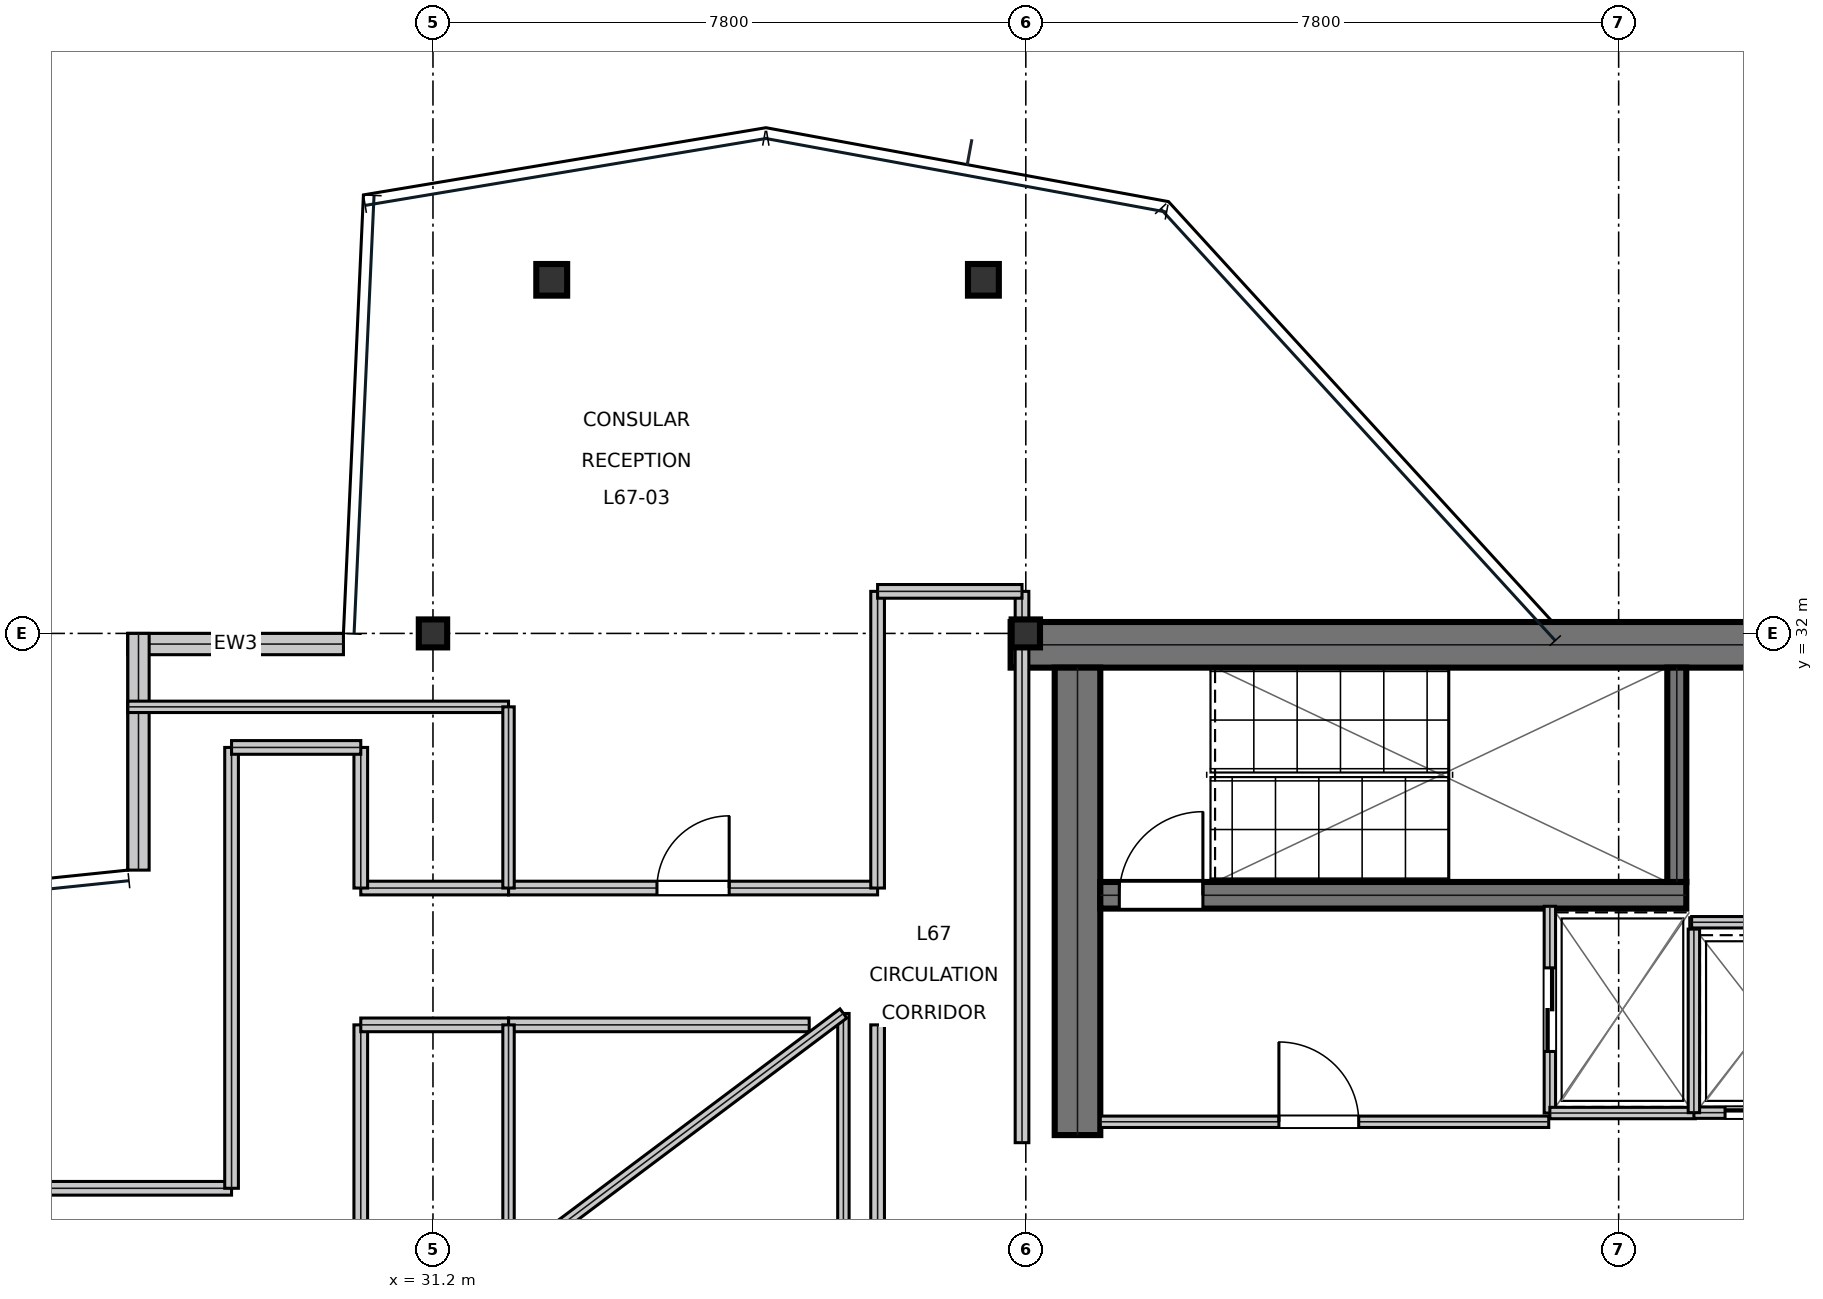
"""IFC4 building model, lengths in metres.
Left out: names, types, materials, properties, quantities, classifications, styles, units other than length and angle.
Written with IfcOpenShell. Run it as: python <this file> out.ifc"""

import sys

from ifc_helpers import new_model, si_unit, direction, frame, frame_2d, origin, origin_2d, place, context, subcontext, project, spatial, rectangle, i_section, extrude, element, fill, save


model = new_model("IFC4")
c1 = context("Model", 3, precision=1e-05, world=origin(), true_north=direction((0.0, 1.0)))
c2 = subcontext(c1, "Body", "Model", "MODEL_VIEW")
j1 = project(units=[si_unit("LENGTHUNIT", "METRE"), si_unit("PLANEANGLEUNIT", "RADIAN")], contexts=[c1])
p1 = place(None, origin())
s1 = spatial("IfcSite", under=j1, at=p1, CompositionType="ELEMENT")
p2 = place(p1, origin())
s2 = spatial("IfcBuilding", under=s1, at=p2, CompositionType="ELEMENT")
p3 = place(p2, frame((0.0, 0.0, 287.1)))
s3 = spatial("IfcBuildingStorey", under=s2, at=p3, CompositionType="ELEMENT", Elevation=287.1)
p4 = place(p3, frame((38.8, 31.85, 0.0), z_axis=(0.0, 0.0, 1.0), x_axis=(1.0, 0.0, 0.0)))
e1 = element("IfcWall", 1, at=p4, inside=s3, PredefinedType="SHEAR", context=c2, shape_type="SweptSolid", body=[
    extrude(rectangle(XDim=16.0, YDim=0.6, at=frame_2d((8.0, 0.0))), origin(), (0.0, 0.0, 1.0), 3.81),
])
p5 = place(p3, frame((39.68, 25.4, 0.0), z_axis=(0.0, 0.0, 1.0), x_axis=(0.0, 1.0, 0.0)))
e2 = element("IfcWall", 2, at=p5, inside=s3, PredefinedType="SHEAR", context=c2, shape_type="SweptSolid", body=[
    extrude(rectangle(XDim=6.15, YDim=0.6, at=frame_2d((3.075, 0.0))), origin(), (0.0, 0.0, 1.0), 3.81),
])
p6 = place(p3, frame((39.98, 28.555, 0.0), z_axis=(0.0, 0.0, 1.0), x_axis=(1.0, 0.0, 0.0)))
e3 = element("IfcWall", 3, at=p6, inside=s3, PredefinedType="SHEAR", context=c2, shape_type="SweptSolid", body=[
    extrude(rectangle(XDim=7.71, YDim=0.35, at=frame_2d((3.855, 0.0))), origin(), (0.0, 0.0, 1.0), 3.81),
])
p7 = place(p6, frame((0.25, 0.0, 0.0)))
e4 = element("IfcOpeningElement", 4, at=p7, cuts=e3, PredefinedType="OPENING", context=c2, shape_type="SweptSolid", body=[
    extrude(rectangle(XDim=1.1, YDim=2.15, at=frame_2d((0.55, 1.075))), frame((0.0, 0.185, 0.0), z_axis=(0.0, -1.0, 0.0), x_axis=(1.0, 0.0, 0.0)), (0.0, 0.0, 1.0), 0.37),
])
p8 = place(p3, frame((47.565, 28.73, 0.0), z_axis=(0.0, 0.0, 1.0), x_axis=(0.0, 1.0, 0.0)))
e5 = element("IfcWall", 5, at=p8, inside=s3, PredefinedType="SHEAR", context=c2, shape_type="SweptSolid", body=[
    extrude(rectangle(XDim=2.82, YDim=0.25, at=frame_2d((1.41, 0.0))), origin(), (0.0, 0.0, 1.0), 3.81),
])
for number, where, z_axis, x_axis in (
    (6, (31.2, 32.0, 0.0), (0.0, 0.0, 1.0), (1.0, 0.0, 0.0)),
    (7, (39.0, 32.0, 0.0), (0.0, 0.0, 1.0), (1.0, 0.0, 0.0)),
):
    element("IfcColumn", number, at=place(p3, frame(where, z_axis=z_axis, x_axis=x_axis)), inside=s3, PredefinedType="COLUMN", context=c2, shape_type="SweptSolid", body=[
        extrude(i_section(OverallWidth=0.373, OverallDepth=0.368, WebThickness=0.015, FlangeThickness=0.024, at=origin_2d()), origin(), (0.0, 0.0, 1.0), 4.044),
    ])
p9 = place(p3, frame((32.762, 36.652, 0.016), z_axis=(0.013906647751, -0.029878037962, 0.999456806468), x_axis=(0.906606370736, 0.421977355485, 0.0)))
e8 = element("IfcColumn", 8, at=p9, inside=s3, PredefinedType="COLUMN", context=c2, shape_type="SweptSolid", body=[
    extrude(i_section(OverallWidth=0.406, OverallDepth=0.416, WebThickness=0.03, FlangeThickness=0.048, at=origin_2d()), origin(), (0.0, 0.0, 1.0), 4.02),
])
p10 = place(p3, frame((38.442, 36.652, 0.016), z_axis=(-0.004919361467, -0.029880565948, 0.99954137066), x_axis=(0.986717213658, -0.162447346151, 0.0)))
e9 = element("IfcColumn", 9, at=p10, inside=s3, PredefinedType="COLUMN", context=c2, shape_type="SweptSolid", body=[
    extrude(i_section(OverallWidth=0.406, OverallDepth=0.416, WebThickness=0.03, FlangeThickness=0.048, at=origin_2d()), origin(), (0.0, 0.0, 1.0), 4.02),
])
p11 = place(p3, frame((30.022, 31.86, 0.0), z_axis=(0.0, 0.0, 1.0), x_axis=(-1.0, 0.0, 0.0)))
e10 = element("IfcWall", 10, at=p11, inside=s3, PredefinedType="STANDARD", context=c2, shape_type="SweptSolid", body=[
    extrude(rectangle(XDim=2.836, YDim=0.28, at=frame_2d((1.418, 0.0))), origin(), (0.0, 0.0, 1.0), 3.81),
])
p12 = place(p3, frame((27.326, 32.0, 0.0), z_axis=(0.0, 0.0, 1.0), x_axis=(0.0, -1.0, 0.0)))
e11 = element("IfcWall", 11, at=p12, inside=s3, PredefinedType="STANDARD", context=c2, shape_type="SweptSolid", body=[
    extrude(rectangle(XDim=3.114, YDim=0.28, at=frame_2d((1.557, 0.0))), origin(), (0.0, 0.0, 1.0), 3.339),
])
p13 = place(p3, frame((39.98, 25.575, 0.0), z_axis=(0.0, 0.0, 1.0), x_axis=(1.0, 0.0, 0.0)))
e12 = element("IfcWall", 12, at=p13, inside=s3, PredefinedType="PARTITIONING", context=c2, shape_type="SweptSolid", body=[
    extrude(rectangle(XDim=5.9, YDim=0.15, at=frame_2d((2.95, 0.0))), origin(), (0.0, 0.0, 1.0), 3.81),
])
p14 = place(p13, frame((2.35, 0.0, 0.0)))
e13 = element("IfcOpeningElement", 13, at=p14, cuts=e12, PredefinedType="OPENING", context=c2, shape_type="SweptSolid", body=[
    extrude(rectangle(XDim=1.05, YDim=2.15, at=frame_2d((0.525, 1.075))), frame((0.0, 0.085, 0.0), z_axis=(0.0, -1.0, 0.0), x_axis=(1.0, 0.0, 0.0)), (0.0, 0.0, 1.0), 0.17),
])
p15 = place(p3, frame((45.895, 25.69, 0.0), z_axis=(0.0, 0.0, 1.0), x_axis=(0.0, 1.0, 0.0)))
e14 = element("IfcWall", 14, at=p15, inside=s3, PredefinedType="PARTITIONING", context=c2, shape_type="SweptSolid", body=[
    extrude(rectangle(XDim=2.72, YDim=0.15, at=frame_2d((1.36, 0.0))), origin(), (0.0, 0.0, 1.0), 3.81),
])
p16 = place(p15, frame((0.81, 0.0, 0.0)))
e15 = element("IfcOpeningElement", 15, at=p16, cuts=e14, PredefinedType="OPENING", context=c2, shape_type="SweptSolid", body=[
    extrude(rectangle(XDim=1.1, YDim=2.15, at=frame_2d((0.55, 1.075))), frame((0.0, 0.085, 0.0), z_axis=(0.0, -1.0, 0.0), x_axis=(1.0, 0.0, 0.0)), (0.0, 0.0, 1.0), 0.17),
])
p17 = place(p3, frame((45.895, 25.69, 0.0), z_axis=(0.0, 0.0, 1.0), x_axis=(1.0, 0.0, 0.0)))
e16 = element("IfcWall", 16, at=p17, inside=s3, PredefinedType="PARTITIONING", context=c2, shape_type="SweptSolid", body=[
    extrude(rectangle(XDim=1.915, YDim=0.15, at=frame_2d((0.958, 0.0))), origin(), (0.0, 0.0, 1.0), 3.81),
])
p18 = place(p3, frame((47.79, 25.695, 0.0), z_axis=(0.0, 0.0, 1.0), x_axis=(1.0, 0.0, 0.0)))
e17 = element("IfcWall", 17, at=p18, inside=s3, PredefinedType="PARTITIONING", context=c2, shape_type="SweptSolid", body=[
    extrude(rectangle(XDim=1.92, YDim=0.15, at=frame_2d((0.96, 0.0))), origin(), (0.0, 0.0, 1.0), 3.81),
])
p19 = place(p18, frame((0.41, 0.0, 0.0)))
e18 = element("IfcOpeningElement", 18, at=p19, cuts=e17, PredefinedType="OPENING", context=c2, shape_type="SweptSolid", body=[
    extrude(rectangle(XDim=1.1, YDim=2.15, at=frame_2d((0.55, 1.075))), frame((0.0, 0.085, 0.0), z_axis=(0.0, -1.0, 0.0), x_axis=(1.0, 0.0, 0.0)), (0.0, 0.0, 1.0), 0.17),
])
p20 = place(p3, frame((47.79, 25.695, 0.0), z_axis=(0.0, 0.0, 1.0), x_axis=(0.0, 1.0, 0.0)))
e19 = element("IfcWall", 19, at=p20, inside=s3, PredefinedType="PARTITIONING", context=c2, shape_type="SweptSolid", body=[
    extrude(rectangle(XDim=2.415, YDim=0.15, at=frame_2d((1.208, 0.0))), origin(), (0.0, 0.0, 1.0), 3.81),
])
p21 = place(p3, frame((47.76, 28.2, 0.0), z_axis=(0.0, 0.0, 1.0), x_axis=(1.0, 0.0, 0.0)))
e20 = element("IfcWall", 20, at=p21, inside=s3, PredefinedType="PARTITIONING", context=c2, shape_type="SweptSolid", body=[
    extrude(rectangle(XDim=2.04, YDim=0.15, at=frame_2d((1.02, 0.0))), origin(), (0.0, 0.0, 1.0), 3.81),
])
p22 = place(p3, frame((37.05, 15.447, 0.0), z_axis=(0.0, 0.0, 1.0), x_axis=(0.0, 1.0, 0.0)))
e21 = element("IfcWall", 21, at=p22, inside=s3, PredefinedType="SOLIDWALL", context=c2, shape_type="SweptSolid", body=[
    extrude(rectangle(XDim=11.403, YDim=0.18, at=frame_2d((5.702, 0.0))), origin(), (0.0, 0.0, 1.0), 3.27),
])
p23 = place(p22, frame((3.607, 0.0, 0.0)))
e22 = element("IfcOpeningElement", 22, at=p23, cuts=e21, PredefinedType="OPENING", context=c2, shape_type="SweptSolid", body=[
    extrude(rectangle(XDim=0.95, YDim=2.15, at=frame_2d((0.475, 1.075))), frame((0.0, 0.1, 0.0), z_axis=(0.0, -1.0, 0.0), x_axis=(1.0, 0.0, 0.0)), (0.0, 0.0, 1.0), 0.2),
])
p24 = place(p3, frame((30.25, 17.5, 0.0), z_axis=(0.0, 0.0, 1.0), x_axis=(0.0, 1.0, 0.0)))
e23 = element("IfcWall", 23, at=p24, inside=s3, PredefinedType="SOLIDWALL", context=c2, shape_type="SweptSolid", body=[
    extrude(rectangle(XDim=9.35, YDim=0.18, at=frame_2d((4.675, 0.0))), origin(), (0.0, 0.0, 1.0), 3.27),
])
p25 = place(p24, frame((4.02, 0.0, 0.0)))
e24 = element("IfcOpeningElement", 24, at=p25, cuts=e23, PredefinedType="OPENING", context=c2, shape_type="SweptSolid", body=[
    extrude(rectangle(XDim=0.95, YDim=2.15, at=frame_2d((0.475, 1.075))), frame((0.0, 0.1, 0.0), z_axis=(0.0, -1.0, 0.0), x_axis=(1.0, 0.0, 0.0)), (0.0, 0.0, 1.0), 0.2),
])
p26 = place(p3, frame((32.194, 28.65, 0.0), z_axis=(0.0, 0.0, 1.0), x_axis=(1.0, 0.0, 0.0)))
e25 = element("IfcWall", 25, at=p26, inside=s3, PredefinedType="SOLIDWALL", context=c2, shape_type="SweptSolid", body=[
    extrude(rectangle(XDim=4.856, YDim=0.18, at=frame_2d((2.428, 0.0))), origin(), (0.0, 0.0, 1.0), 3.81),
])
p27 = place(p26, frame((1.953, 0.0, 0.0)))
e26 = element("IfcOpeningElement", 26, at=p27, cuts=e25, PredefinedType="OPENING", context=c2, shape_type="SweptSolid", body=[
    extrude(rectangle(XDim=0.95, YDim=2.15, at=frame_2d((0.475, 1.075))), frame((0.0, 0.1, 0.0), z_axis=(0.0, -1.0, 0.0), x_axis=(1.0, 0.0, 0.0)), (0.0, 0.0, 1.0), 0.2),
])
p28 = place(p3, frame((32.194, 26.85, 0.0), z_axis=(0.0, 0.0, 1.0), x_axis=(1.0, 0.0, 0.0)))
e27 = element("IfcWall", 27, at=p28, inside=s3, PredefinedType="SOLIDWALL", context=c2, shape_type="SweptSolid", body=[
    extrude(rectangle(XDim=3.956, YDim=0.18, at=frame_2d((1.978, 0.0))), origin(), (0.0, 0.0, 1.0), 3.81),
])
p29 = place(p3, frame((21.0, 24.7, 0.0), z_axis=(0.0, 0.0, 1.0), x_axis=(1.0, 0.0, 0.0)))
e28 = element("IfcWall", 28, at=p29, inside=s3, PredefinedType="SOLIDWALL", context=c2, shape_type="SweptSolid", body=[
    extrude(rectangle(XDim=7.55, YDim=0.18, at=frame_2d((3.775, 0.0))), origin(), (0.0, 0.0, 1.0), 3.27),
])
p30 = place(p3, frame((28.55, 24.7, 0.0), z_axis=(0.0, 0.0, 1.0), x_axis=(0.0, 1.0, 0.0)))
e29 = element("IfcWall", 29, at=p30, inside=s3, PredefinedType="SOLIDWALL", context=c2, shape_type="SweptSolid", body=[
    extrude(rectangle(XDim=5.8, YDim=0.18, at=frame_2d((2.9, 0.0))), origin(), (0.0, 0.0, 1.0), 3.81),
])
for number, where, z_axis, x_axis in (
    (30, (30.25, 26.85, 0.0), (0.0, 0.0, 1.0), (1.0, 0.0, 0.0)),
    (31, (30.25, 28.65, 0.0), (0.0, 0.0, 1.0), (1.0, 0.0, 0.0)),
):
    element("IfcWall", number, at=place(p3, frame(where, z_axis=z_axis, x_axis=x_axis)), inside=s3, PredefinedType="SOLIDWALL", context=c2, shape_type="SweptSolid", body=[
        extrude(rectangle(XDim=1.944, YDim=0.18, at=frame_2d((0.972, 0.0))), origin(), (0.0, 0.0, 1.0), 3.27),
    ])
p31 = place(p3, frame((30.25, 28.65, 0.0), z_axis=(0.0, 0.0, 1.0), x_axis=(0.0, 1.0, 0.0)))
e32 = element("IfcWall", 32, at=p31, inside=s3, PredefinedType="SOLIDWALL", context=c2, shape_type="SweptSolid", body=[
    extrude(rectangle(XDim=1.85, YDim=0.18, at=frame_2d((0.925, 0.0))), origin(), (0.0, 0.0, 1.0), 3.81),
])
p32 = place(p3, frame((28.55, 30.5, 0.0), z_axis=(0.0, 0.0, 1.0), x_axis=(1.0, 0.0, 0.0)))
e33 = element("IfcWall", 33, at=p32, inside=s3, PredefinedType="SOLIDWALL", context=c2, shape_type="SweptSolid", body=[
    extrude(rectangle(XDim=1.7, YDim=0.18, at=frame_2d((0.85, 0.0))), origin(), (0.0, 0.0, 1.0), 3.81),
])
p33 = place(p3, frame((38.95, 25.3, 0.0), z_axis=(0.0, 0.0, 1.0), x_axis=(0.0, 1.0, 0.0)))
e34 = element("IfcWall", 34, at=p33, inside=s3, PredefinedType="SOLIDWALL", context=c2, shape_type="SweptSolid", body=[
    extrude(rectangle(XDim=7.253, YDim=0.18, at=frame_2d((3.626, 0.0))), origin(), (0.0, 0.0, 1.0), 3.27),
])
p34 = place(p3, frame((37.05, 28.65, 0.0), z_axis=(0.0, 0.0, 1.0), x_axis=(0.0, 1.0, 0.0)))
e35 = element("IfcWall", 35, at=p34, inside=s3, PredefinedType="SOLIDWALL", context=c2, shape_type="SweptSolid", body=[
    extrude(rectangle(XDim=3.903, YDim=0.18, at=frame_2d((1.952, 0.0))), origin(), (0.0, 0.0, 1.0), 3.27),
])
p35 = place(p3, frame((37.05, 32.553, 0.0), z_axis=(0.0, 0.0, 1.0), x_axis=(1.0, 0.0, 0.0)))
e36 = element("IfcWall", 36, at=p35, inside=s3, PredefinedType="SOLIDWALL", context=c2, shape_type="SweptSolid", body=[
    extrude(rectangle(XDim=1.9, YDim=0.18, at=frame_2d((0.95, 0.0))), origin(), (0.0, 0.0, 1.0), 3.27),
])
p36 = place(p3, frame((32.194, 15.794, 0.0), z_axis=(0.0, 0.0, 1.0), x_axis=(0.0, 1.0, 0.0)))
e37 = element("IfcWall", 37, at=p36, inside=s3, PredefinedType="MOVABLE", context=c2, shape_type="SweptSolid", body=[
    extrude(rectangle(XDim=11.056, YDim=0.15, at=frame_2d((5.528, 0.0))), origin(), (0.0, 0.0, 1.0), 3.27),
])
p37 = place(p3, frame((27.186, 31.034, 0.0), z_axis=(0.0, 0.0, 1.0), x_axis=(1.0, 0.0, 0.0)))
e38 = element("IfcWall", 38, at=p37, inside=s3, PredefinedType="MOVABLE", context=c2, shape_type="SweptSolid", body=[
    extrude(rectangle(XDim=5.009, YDim=0.15, at=frame_2d((2.504, 0.0))), origin(), (0.0, 0.0, 1.0), 3.27),
])
p38 = place(p3, frame((32.194, 28.65, 0.0), z_axis=(0.0, 0.0, 1.0), x_axis=(0.0, 1.0, 0.0)))
e39 = element("IfcWall", 39, at=p38, inside=s3, PredefinedType="MOVABLE", context=c2, shape_type="SweptSolid", body=[
    extrude(rectangle(XDim=2.384, YDim=0.15, at=frame_2d((1.192, 0.0))), origin(), (0.0, 0.0, 1.0), 3.54),
])
p39 = place(p3, frame((36.6, 21.0, 0.0), z_axis=(0.0, 0.0, 1.0), x_axis=(0.0, 1.0, 0.0)))
e40 = element("IfcWall", 40, at=p39, inside=s3, PredefinedType="MOVABLE", context=c2, shape_type="SweptSolid", body=[
    extrude(rectangle(XDim=6.0, YDim=0.15, at=frame_2d((3.0, 0.0))), origin(), (0.0, 0.0, 1.0), 3.81),
])
p40 = place(p3, frame((36.6, 27.0, 0.0), z_axis=(0.0, 0.0, 1.0), x_axis=(-0.8, -0.6, 0.0)))
e41 = element("IfcWall", 41, at=p40, inside=s3, PredefinedType="MOVABLE", context=c2, shape_type="SweptSolid", body=[
    extrude(rectangle(XDim=5.0, YDim=0.15, at=frame_2d((2.5, 0.0))), origin(), (0.0, 0.0, 1.0), 3.81),
])
p41 = place(p14, origin())
e42 = element("IfcDoor", 42, at=p41, inside=s3, OperationType="SINGLE_SWING_LEFT", PredefinedType="DOOR", context=c2, shape_type="SweptSolid", body=[
    extrude(rectangle(XDim=1.05, YDim=2.15, at=frame_2d((0.525, 1.075))), frame((0.0, 0.025, 0.0), z_axis=(0.0, -1.0, 0.0), x_axis=(1.0, 0.0, 0.0)), (0.0, 0.0, 1.0), 0.05),
])
fill(e13, e42)
p42 = place(p16, frame((1.1, 0.0, 0.0), z_axis=(0.0, 0.0, 1.0), x_axis=(-1.0, 0.0, 0.0)))
e43 = element("IfcDoor", 43, at=p42, inside=s3, OperationType="DOUBLE_DOOR_SLIDING", PredefinedType="DOOR", context=c2, shape_type="SweptSolid", body=[
    extrude(rectangle(XDim=1.1, YDim=2.15, at=frame_2d((0.55, 1.075))), frame((0.0, 0.025, 0.0), z_axis=(0.0, -1.0, 0.0), x_axis=(1.0, 0.0, 0.0)), (0.0, 0.0, 1.0), 0.05),
])
fill(e15, e43)
p43 = place(p19, frame((1.1, 0.0, 0.0), z_axis=(0.0, 0.0, 1.0), x_axis=(-1.0, 0.0, 0.0)))
e44 = element("IfcDoor", 44, at=p43, inside=s3, OperationType="DOUBLE_DOOR_SLIDING", PredefinedType="DOOR", context=c2, shape_type="SweptSolid", body=[
    extrude(rectangle(XDim=1.1, YDim=2.15, at=frame_2d((0.55, 1.075))), frame((0.0, 0.025, 0.0), z_axis=(0.0, -1.0, 0.0), x_axis=(1.0, 0.0, 0.0)), (0.0, 0.0, 1.0), 0.05),
])
fill(e18, e44)
p44 = place(p27, origin())
e45 = element("IfcDoor", 45, at=p44, inside=s3, OperationType="SINGLE_SWING_RIGHT", PredefinedType="DOOR", context=c2, shape_type="SweptSolid", body=[
    extrude(rectangle(XDim=0.95, YDim=2.15, at=frame_2d((0.475, 1.075))), frame((0.0, 0.025, 0.0), z_axis=(0.0, -1.0, 0.0), x_axis=(1.0, 0.0, 0.0)), (0.0, 0.0, 1.0), 0.05),
])
fill(e26, e45)
p45 = place(p7, origin())
e46 = element("IfcDoor", 46, at=p45, inside=s3, OperationType="SINGLE_SWING_RIGHT", PredefinedType="DOOR", context=c2, shape_type="SweptSolid", body=[
    extrude(rectangle(XDim=1.1, YDim=2.15, at=frame_2d((0.55, 1.075))), frame((0.0, 0.025, 0.0), z_axis=(0.0, -1.0, 0.0), x_axis=(1.0, 0.0, 0.0)), (0.0, 0.0, 1.0), 0.05),
])
fill(e4, e46)
save(model, sys.argv[1])
